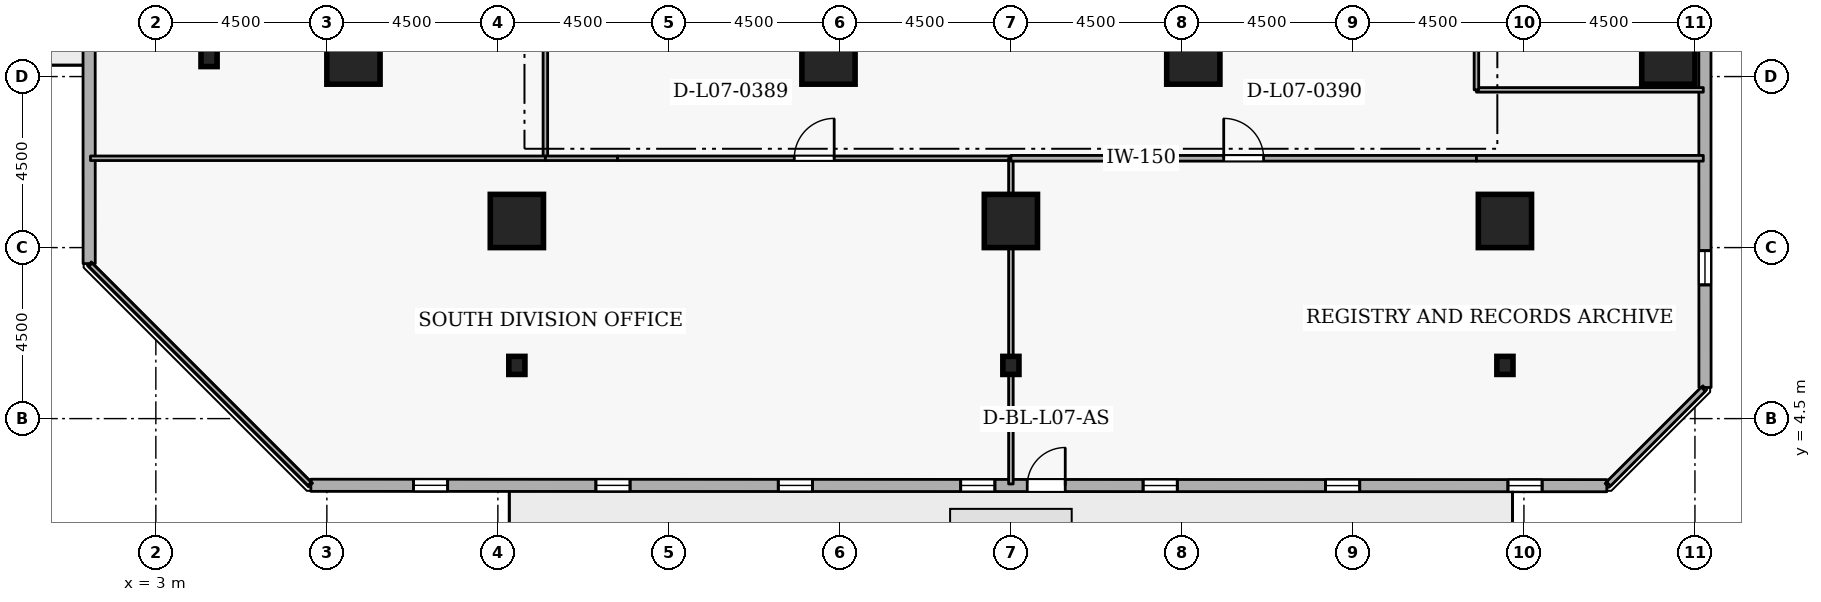
"""IFC4 building model, lengths in metres.
Left out: names, types, materials, properties, quantities, classifications, styles, units other than length and angle.
Written with IfcOpenShell. Run it as: python <this file> out.ifc"""

import sys

from ifc_helpers import new_model, si_unit, direction, frame, frame_2d, origin, origin_2d, place, context, subcontext, project, spatial, rectangle, i_section, extrude, element, fill, save


model = new_model("IFC4")
c1 = context("Model", 3, precision=1e-05, world=origin(), true_north=direction((0.0, 1.0)))
c2 = subcontext(c1, "Body", "Model", "MODEL_VIEW")
j1 = project(units=[si_unit("LENGTHUNIT", "METRE"), si_unit("PLANEANGLEUNIT", "RADIAN")], contexts=[c1])
p1 = place(None, origin())
s1 = spatial("IfcSite", under=j1, at=p1, CompositionType="ELEMENT")
p2 = place(p1, origin())
s2 = spatial("IfcBuilding", under=s1, at=p2, CompositionType="ELEMENT")
p3 = place(p2, frame((0.0, 0.0, 31.5)))
s3 = spatial("IfcBuildingStorey", under=s2, at=p3, CompositionType="ELEMENT", Elevation=31.5)
for number, where, z_axis, x_axis in (
    (1, (12.5, 9.7, 0.0), (0.0, 0.0, 1.0), (1.0, 0.0, 0.0)),
    (2, (25.5, 9.7, 0.0), (0.0, 0.0, 1.0), (1.0, 0.0, 0.0)),
    (3, (38.5, 9.7, 0.0), (0.0, 0.0, 1.0), (1.0, 0.0, 0.0)),
    (4, (42.8, 14.0, 0.0), (0.0, 0.0, 1.0), (1.0, 0.0, 0.0)),
    (5, (8.2, 14.0, 0.0), (0.0, 0.0, 1.0), (1.0, 0.0, 0.0)),
    (6, (20.7, 14.0, 0.0), (0.0, 0.0, 1.0), (1.0, 0.0, 0.0)),
    (7, (30.3, 14.0, 0.0), (0.0, 0.0, 1.0), (1.0, 0.0, 0.0)),
):
    element("IfcColumn", number, at=place(p3, frame(where, z_axis=z_axis, x_axis=x_axis)), inside=s3, PredefinedType="COLUMN", context=c2, shape_type="SweptSolid", body=[
        extrude(rectangle(XDim=1.4, YDim=1.4, at=origin_2d()), origin(), (0.0, 0.0, 1.0), 3.6),
    ])
for number, where, z_axis, x_axis in (
    (8, (12.5, 5.9, 0.0), (0.0, 0.0, 1.0), (1.0, 0.0, 0.0)),
    (9, (25.5, 5.9, 0.0), (0.0, 0.0, 1.0), (1.0, 0.0, 0.0)),
    (10, (38.5, 5.9, 0.0), (0.0, 0.0, 1.0), (1.0, 0.0, 0.0)),
    (11, (4.4, 14.0, 0.0), (0.0, 0.0, 1.0), (1.0, 0.0, 0.0)),
):
    element("IfcColumn", number, at=place(p3, frame(where, z_axis=z_axis, x_axis=x_axis)), inside=s3, PredefinedType="COLUMN", context=c2, shape_type="SweptSolid", body=[
        extrude(i_section(OverallWidth=0.424, OverallDepth=0.475, WebThickness=0.048, FlangeThickness=0.077, FilletRadius=0.015, at=origin_2d()), origin(), (0.0, 0.0, 1.0), 3.6),
    ])
p4 = place(p3, frame((7.079, 2.746, 0.0), z_axis=(0.0, 0.0, 1.0), x_axis=(0.999999952618, -0.000307837676, 0.0)))
e12 = element("IfcWall", 12, at=p4, inside=s3, PredefinedType="STANDARD", context=c2, shape_type="SweptSolid", body=[
    extrude(rectangle(XDim=34.103, YDim=0.32, at=frame_2d((17.051, 0.0))), origin(), (0.0, 0.0, 1.0), 2.7),
])
p5 = place(p4, frame((18.851, 0.0, 0.0)))
e13 = element("IfcOpeningElement", 13, at=p5, cuts=e12, PredefinedType="OPENING", context=c2, shape_type="SweptSolid", body=[
    extrude(rectangle(XDim=1.0, YDim=2.08, at=frame_2d((0.5, 1.04))), frame((0.0, 0.17, 0.0), z_axis=(0.0, -1.0, 0.0), x_axis=(1.0, 0.0, 0.0)), (0.0, 0.0, 1.0), 0.34),
])
p6 = place(p4, frame((2.7, 0.0, 0.72)))
e14 = element("IfcOpeningElement", 14, at=p6, cuts=e12, PredefinedType="OPENING", context=c2, shape_type="SweptSolid", body=[
    extrude(rectangle(XDim=0.9, YDim=1.75, at=frame_2d((0.45, 0.875))), frame((0.0, 0.17, 0.0), z_axis=(0.0, -1.0, 0.0), x_axis=(1.0, 0.0, 0.0)), (0.0, 0.0, 1.0), 0.34),
])
p7 = place(p4, frame((7.5, 0.0, 0.72)))
e15 = element("IfcOpeningElement", 15, at=p7, cuts=e12, PredefinedType="OPENING", context=c2, shape_type="SweptSolid", body=[
    extrude(rectangle(XDim=0.9, YDim=1.75, at=frame_2d((0.45, 0.875))), frame((0.0, 0.17, 0.0), z_axis=(0.0, -1.0, 0.0), x_axis=(1.0, 0.0, 0.0)), (0.0, 0.0, 1.0), 0.34),
])
p8 = place(p4, frame((12.3, 0.0, 0.72)))
e16 = element("IfcOpeningElement", 16, at=p8, cuts=e12, PredefinedType="OPENING", context=c2, shape_type="SweptSolid", body=[
    extrude(rectangle(XDim=0.9, YDim=1.75, at=frame_2d((0.45, 0.875))), frame((0.0, 0.17, 0.0), z_axis=(0.0, -1.0, 0.0), x_axis=(1.0, 0.0, 0.0)), (0.0, 0.0, 1.0), 0.34),
])
p9 = place(p4, frame((17.1, 0.0, 0.72)))
e17 = element("IfcOpeningElement", 17, at=p9, cuts=e12, PredefinedType="OPENING", context=c2, shape_type="SweptSolid", body=[
    extrude(rectangle(XDim=0.9, YDim=1.75, at=frame_2d((0.45, 0.875))), frame((0.0, 0.17, 0.0), z_axis=(0.0, -1.0, 0.0), x_axis=(1.0, 0.0, 0.0)), (0.0, 0.0, 1.0), 0.34),
])
p10 = place(p4, frame((21.9, 0.0, 0.72)))
e18 = element("IfcOpeningElement", 18, at=p10, cuts=e12, PredefinedType="OPENING", context=c2, shape_type="SweptSolid", body=[
    extrude(rectangle(XDim=0.9, YDim=1.75, at=frame_2d((0.45, 0.875))), frame((0.0, 0.17, 0.0), z_axis=(0.0, -1.0, 0.0), x_axis=(1.0, 0.0, 0.0)), (0.0, 0.0, 1.0), 0.34),
])
p11 = place(p4, frame((26.7, 0.0, 0.72)))
e19 = element("IfcOpeningElement", 19, at=p11, cuts=e12, PredefinedType="OPENING", context=c2, shape_type="SweptSolid", body=[
    extrude(rectangle(XDim=0.9, YDim=1.75, at=frame_2d((0.45, 0.875))), frame((0.0, 0.17, 0.0), z_axis=(0.0, -1.0, 0.0), x_axis=(1.0, 0.0, 0.0)), (0.0, 0.0, 1.0), 0.34),
])
p12 = place(p4, frame((31.5, 0.0, 0.72)))
e20 = element("IfcOpeningElement", 20, at=p12, cuts=e12, PredefinedType="OPENING", context=c2, shape_type="SweptSolid", body=[
    extrude(rectangle(XDim=0.9, YDim=1.75, at=frame_2d((0.45, 0.875))), frame((0.0, 0.17, 0.0), z_axis=(0.0, -1.0, 0.0), x_axis=(1.0, 0.0, 0.0)), (0.0, 0.0, 1.0), 0.34),
])
p13 = place(p3, frame((43.765, 5.319, 0.0), z_axis=(0.0, 0.0, 1.0), x_axis=(-0.000307837676, 0.999999952618, 0.0)))
e21 = element("IfcWall", 21, at=p13, inside=s3, PredefinedType="STANDARD", context=c2, shape_type="SweptSolid", body=[
    extrude(rectangle(XDim=34.103, YDim=0.32, at=frame_2d((17.051, 0.0))), origin(), (0.0, 0.0, 1.0), 2.7),
])
p14 = place(p13, frame((2.7, 0.0, 0.72)))
e22 = element("IfcOpeningElement", 22, at=p14, cuts=e21, PredefinedType="OPENING", context=c2, shape_type="SweptSolid", body=[
    extrude(rectangle(XDim=0.9, YDim=1.75, at=frame_2d((0.45, 0.875))), frame((0.0, 0.17, 0.0), z_axis=(0.0, -1.0, 0.0), x_axis=(1.0, 0.0, 0.0)), (0.0, 0.0, 1.0), 0.34),
])
p15 = place(p13, frame((12.3, 0.0, 0.72)))
e23 = element("IfcOpeningElement", 23, at=p15, cuts=e21, PredefinedType="OPENING", context=c2, shape_type="SweptSolid", body=[
    extrude(rectangle(XDim=0.9, YDim=1.75, at=frame_2d((0.45, 0.875))), frame((0.0, 0.17, 0.0), z_axis=(0.0, -1.0, 0.0), x_axis=(1.0, 0.0, 0.0)), (0.0, 0.0, 1.0), 0.34),
])
p16 = place(p13, frame((17.1, 0.0, 0.72)))
e24 = element("IfcOpeningElement", 24, at=p16, cuts=e21, PredefinedType="OPENING", context=c2, shape_type="SweptSolid", body=[
    extrude(rectangle(XDim=0.9, YDim=1.75, at=frame_2d((0.45, 0.875))), frame((0.0, 0.17, 0.0), z_axis=(0.0, -1.0, 0.0), x_axis=(1.0, 0.0, 0.0)), (0.0, 0.0, 1.0), 0.34),
])
p17 = place(p13, frame((26.7, 0.0, 0.72)))
e25 = element("IfcOpeningElement", 25, at=p17, cuts=e21, PredefinedType="OPENING", context=c2, shape_type="SweptSolid", body=[
    extrude(rectangle(XDim=0.9, YDim=1.75, at=frame_2d((0.45, 0.875))), frame((0.0, 0.17, 0.0), z_axis=(0.0, -1.0, 0.0), x_axis=(1.0, 0.0, 0.0)), (0.0, 0.0, 1.0), 0.34),
])
p18 = place(p13, frame((31.5, 0.0, 0.72)))
e26 = element("IfcOpeningElement", 26, at=p18, cuts=e21, PredefinedType="OPENING", context=c2, shape_type="SweptSolid", body=[
    extrude(rectangle(XDim=0.9, YDim=1.75, at=frame_2d((0.45, 0.875))), frame((0.0, 0.17, 0.0), z_axis=(0.0, -1.0, 0.0), x_axis=(1.0, 0.0, 0.0)), (0.0, 0.0, 1.0), 0.34),
])
p19 = place(p3, frame((1.235, 42.681, 0.0), z_axis=(0.0, 0.0, 1.0), x_axis=(0.000307837676, -0.999999952618, 0.0)))
e27 = element("IfcWall", 27, at=p19, inside=s3, PredefinedType="STANDARD", context=c2, shape_type="SweptSolid", body=[
    extrude(rectangle(XDim=34.103, YDim=0.32, at=frame_2d((17.051, 0.0))), origin(), (0.0, 0.0, 1.0), 2.7),
])
p20 = place(p19, frame((18.851, 0.0, 0.0)))
e28 = element("IfcOpeningElement", 28, at=p20, cuts=e27, PredefinedType="OPENING", context=c2, shape_type="SweptSolid", body=[
    extrude(rectangle(XDim=1.0, YDim=2.08, at=frame_2d((0.5, 1.04))), frame((0.0, 0.17, 0.0), z_axis=(0.0, -1.0, 0.0), x_axis=(1.0, 0.0, 0.0)), (0.0, 0.0, 1.0), 0.34),
])
p21 = place(p19, frame((2.7, 0.0, 0.72)))
e29 = element("IfcOpeningElement", 29, at=p21, cuts=e27, PredefinedType="OPENING", context=c2, shape_type="SweptSolid", body=[
    extrude(rectangle(XDim=0.9, YDim=1.75, at=frame_2d((0.45, 0.875))), frame((0.0, 0.17, 0.0), z_axis=(0.0, -1.0, 0.0), x_axis=(1.0, 0.0, 0.0)), (0.0, 0.0, 1.0), 0.34),
])
p22 = place(p19, frame((7.5, 0.0, 0.72)))
e30 = element("IfcOpeningElement", 30, at=p22, cuts=e27, PredefinedType="OPENING", context=c2, shape_type="SweptSolid", body=[
    extrude(rectangle(XDim=0.9, YDim=1.75, at=frame_2d((0.45, 0.875))), frame((0.0, 0.17, 0.0), z_axis=(0.0, -1.0, 0.0), x_axis=(1.0, 0.0, 0.0)), (0.0, 0.0, 1.0), 0.34),
])
p23 = place(p19, frame((12.3, 0.0, 0.72)))
e31 = element("IfcOpeningElement", 31, at=p23, cuts=e27, PredefinedType="OPENING", context=c2, shape_type="SweptSolid", body=[
    extrude(rectangle(XDim=0.9, YDim=1.75, at=frame_2d((0.45, 0.875))), frame((0.0, 0.17, 0.0), z_axis=(0.0, -1.0, 0.0), x_axis=(1.0, 0.0, 0.0)), (0.0, 0.0, 1.0), 0.34),
])
p24 = place(p19, frame((17.1, 0.0, 0.72)))
e32 = element("IfcOpeningElement", 32, at=p24, cuts=e27, PredefinedType="OPENING", context=c2, shape_type="SweptSolid", body=[
    extrude(rectangle(XDim=0.9, YDim=1.75, at=frame_2d((0.45, 0.875))), frame((0.0, 0.17, 0.0), z_axis=(0.0, -1.0, 0.0), x_axis=(1.0, 0.0, 0.0)), (0.0, 0.0, 1.0), 0.34),
])
p25 = place(p19, frame((21.9, 0.0, 0.72)))
e33 = element("IfcOpeningElement", 33, at=p25, cuts=e27, PredefinedType="OPENING", context=c2, shape_type="SweptSolid", body=[
    extrude(rectangle(XDim=0.9, YDim=1.75, at=frame_2d((0.45, 0.875))), frame((0.0, 0.17, 0.0), z_axis=(0.0, -1.0, 0.0), x_axis=(1.0, 0.0, 0.0)), (0.0, 0.0, 1.0), 0.34),
])
p26 = place(p19, frame((26.7, 0.0, 0.72)))
e34 = element("IfcOpeningElement", 34, at=p26, cuts=e27, PredefinedType="OPENING", context=c2, shape_type="SweptSolid", body=[
    extrude(rectangle(XDim=0.9, YDim=1.75, at=frame_2d((0.45, 0.875))), frame((0.0, 0.17, 0.0), z_axis=(0.0, -1.0, 0.0), x_axis=(1.0, 0.0, 0.0)), (0.0, 0.0, 1.0), 0.34),
])
p27 = place(p3, frame((13.25, 20.7, 0.0), z_axis=(0.0, 0.0, 1.0), x_axis=(0.0, -1.0, 0.0)))
e35 = element("IfcWall", 35, at=p27, inside=s3, PredefinedType="PARTITIONING", context=c2, shape_type="SweptSolid", body=[
    extrude(rectangle(XDim=9.35, YDim=0.12, at=frame_2d((4.675, 0.0))), origin(), (0.0, 0.0, 1.0), 3.34),
])
p28 = place(p27, frame((4.15, 0.0, 0.0)))
e36 = element("IfcOpeningElement", 36, at=p28, cuts=e35, PredefinedType="OPENING", context=c2, shape_type="SweptSolid", body=[
    extrude(rectangle(XDim=1.05, YDim=2.1, at=frame_2d((0.525, 1.05))), frame((0.0, 0.07, 0.0), z_axis=(0.0, -1.0, 0.0), x_axis=(1.0, 0.0, 0.0)), (0.0, 0.0, 1.0), 0.14),
])
p29 = place(p3, frame((13.25, 11.35, 0.0), z_axis=(0.0, 0.0, 1.0), x_axis=(-1.0, 0.0, 0.0)))
e37 = element("IfcWall", 37, at=p29, inside=s3, PredefinedType="PARTITIONING", context=c2, shape_type="SweptSolid", body=[
    extrude(rectangle(XDim=11.97, YDim=0.12, at=frame_2d((5.985, 0.0))), origin(), (0.0, 0.0, 1.0), 3.34),
])
p30 = place(p3, frame((43.72, 13.15, 0.0), z_axis=(0.0, 0.0, 1.0), x_axis=(-1.0, 0.0, 0.0)))
e38 = element("IfcWall", 38, at=p30, inside=s3, PredefinedType="PARTITIONING", context=c2, shape_type="SweptSolid", body=[
    extrude(rectangle(XDim=5.97, YDim=0.12, at=frame_2d((2.985, 0.0))), origin(), (0.0, 0.0, 1.0), 3.34),
])
p31 = place(p3, frame((37.75, 13.15, 0.0), z_axis=(0.0, 0.0, 1.0), x_axis=(0.0, 1.0, 0.0)))
e39 = element("IfcWall", 39, at=p31, inside=s3, PredefinedType="PARTITIONING", context=c2, shape_type="SweptSolid", body=[
    extrude(rectangle(XDim=1.862, YDim=0.12, at=frame_2d((0.931, 0.0))), origin(), (0.0, 0.0, 1.0), 3.34),
])
p32 = place(p3, frame((7.048, 2.78, 0.0), z_axis=(0.0, 0.0, 1.0), x_axis=(-0.707106781187, 0.707106781187, 0.0)))
e40 = element("IfcWall", 40, at=p32, inside=s3, PredefinedType="PARTITIONING", context=c2, shape_type="SweptSolid", body=[
    extrude(rectangle(XDim=8.156, YDim=0.12, at=frame_2d((4.078, 0.0))), origin(), (0.0, 0.0, 1.0), 3.34),
])
p33 = place(p3, frame((13.25, 11.35, 0.0), z_axis=(0.0, 0.0, 1.0), x_axis=(1.0, 0.0, 0.0)))
e41 = element("IfcWall", 41, at=p33, inside=s3, PredefinedType="PARTITIONING", context=c2, shape_type="SweptSolid", body=[
    extrude(rectangle(XDim=1.9, YDim=0.12, at=frame_2d((0.95, 0.0))), origin(), (0.0, 0.0, 1.0), 3.34),
])
p34 = place(p3, frame((15.15, 11.35, 0.0), z_axis=(0.0, 0.0, 1.0), x_axis=(1.0, 0.0, 0.0)))
e42 = element("IfcWall", 42, at=p34, inside=s3, PredefinedType="PARTITIONING", context=c2, shape_type="SweptSolid", body=[
    extrude(rectangle(XDim=10.35, YDim=0.12, at=frame_2d((5.175, 0.0))), origin(), (0.0, 0.0, 1.0), 3.34),
])
p35 = place(p34, frame((4.65, 0.0, 0.0)))
e43 = element("IfcOpeningElement", 43, at=p35, cuts=e42, PredefinedType="OPENING", context=c2, shape_type="SweptSolid", body=[
    extrude(rectangle(XDim=1.05, YDim=2.1, at=frame_2d((0.525, 1.05))), frame((0.0, 0.07, 0.0), z_axis=(0.0, -1.0, 0.0), x_axis=(1.0, 0.0, 0.0)), (0.0, 0.0, 1.0), 0.14),
])
p36 = place(p3, frame((25.5, 11.35, 0.0), z_axis=(0.0, 0.0, 1.0), x_axis=(0.0, -1.0, 0.0)))
e44 = element("IfcWall", 44, at=p36, inside=s3, PredefinedType="PARTITIONING", context=c2, shape_type="SweptSolid", body=[
    extrude(rectangle(XDim=8.57, YDim=0.12, at=frame_2d((4.285, 0.0))), origin(), (0.0, 0.0, 1.0), 2.878),
])
p37 = place(p3, frame((25.5, 11.35, 0.0), z_axis=(0.0, 0.0, 1.0), x_axis=(1.0, 0.0, 0.0)))
e45 = element("IfcWall", 45, at=p37, inside=s3, PredefinedType="PARTITIONING", context=c2, shape_type="SweptSolid", body=[
    extrude(rectangle(XDim=12.25, YDim=0.15, at=frame_2d((6.125, 0.0))), origin(), (0.0, 0.0, 1.0), 3.34),
])
p38 = place(p37, frame((5.6, 0.0, 0.0)))
e46 = element("IfcOpeningElement", 46, at=p38, cuts=e45, PredefinedType="OPENING", context=c2, shape_type="SweptSolid", body=[
    extrude(rectangle(XDim=1.05, YDim=2.1, at=frame_2d((0.525, 1.05))), frame((0.0, 0.085, 0.0), z_axis=(0.0, -1.0, 0.0), x_axis=(1.0, 0.0, 0.0)), (0.0, 0.0, 1.0), 0.17),
])
p39 = place(p3, frame((37.75, 11.35, 0.0), z_axis=(0.0, 0.0, 1.0), x_axis=(1.0, 0.0, 0.0)))
e47 = element("IfcWall", 47, at=p39, inside=s3, PredefinedType="PARTITIONING", context=c2, shape_type="SweptSolid", body=[
    extrude(rectangle(XDim=5.97, YDim=0.15, at=frame_2d((2.985, 0.0))), origin(), (0.0, 0.0, 1.0), 3.34),
])
p40 = place(p3, frame((43.72, 5.275, 0.0), z_axis=(0.0, 0.0, 1.0), x_axis=(-0.707106781187, -0.707106781187, 0.0)))
e48 = element("IfcWall", 48, at=p40, inside=s3, PredefinedType="PARTITIONING", context=c2, shape_type="SweptSolid", body=[
    extrude(rectangle(XDim=3.528, YDim=0.15, at=frame_2d((1.764, 0.0))), origin(), (0.0, 0.0, 1.0), 3.34),
])
p41 = place(p5, origin())
e49 = element("IfcDoor", 49, at=p41, inside=s3, OperationType="SINGLE_SWING_RIGHT", PredefinedType="DOOR", context=c2, shape_type="SweptSolid", body=[
    extrude(rectangle(XDim=1.0, YDim=2.08, at=frame_2d((0.5, 1.04))), frame((0.0, 0.025, 0.0), z_axis=(0.0, -1.0, 0.0), x_axis=(1.0, 0.0, 0.0)), (0.0, 0.0, 1.0), 0.05),
])
fill(e13, e49)
p42 = place(p6, origin())
e50 = element("IfcWindow", 50, at=p42, inside=s3, PartitioningType="SINGLE_PANEL", PredefinedType="WINDOW", context=c2, shape_type="SweptSolid", body=[
    extrude(rectangle(XDim=0.9, YDim=1.75, at=frame_2d((0.45, 0.875))), frame((0.0, 0.03, 0.0), z_axis=(0.0, -1.0, 0.0), x_axis=(1.0, 0.0, 0.0)), (0.0, 0.0, 1.0), 0.06),
])
fill(e14, e50)
p43 = place(p7, origin())
e51 = element("IfcWindow", 51, at=p43, inside=s3, PartitioningType="SINGLE_PANEL", PredefinedType="WINDOW", context=c2, shape_type="SweptSolid", body=[
    extrude(rectangle(XDim=0.9, YDim=1.75, at=frame_2d((0.45, 0.875))), frame((0.0, 0.03, 0.0), z_axis=(0.0, -1.0, 0.0), x_axis=(1.0, 0.0, 0.0)), (0.0, 0.0, 1.0), 0.06),
])
fill(e15, e51)
p44 = place(p8, origin())
e52 = element("IfcWindow", 52, at=p44, inside=s3, PartitioningType="SINGLE_PANEL", PredefinedType="WINDOW", context=c2, shape_type="SweptSolid", body=[
    extrude(rectangle(XDim=0.9, YDim=1.75, at=frame_2d((0.45, 0.875))), frame((0.0, 0.03, 0.0), z_axis=(0.0, -1.0, 0.0), x_axis=(1.0, 0.0, 0.0)), (0.0, 0.0, 1.0), 0.06),
])
fill(e16, e52)
p45 = place(p9, origin())
e53 = element("IfcWindow", 53, at=p45, inside=s3, PartitioningType="SINGLE_PANEL", PredefinedType="WINDOW", context=c2, shape_type="SweptSolid", body=[
    extrude(rectangle(XDim=0.9, YDim=1.75, at=frame_2d((0.45, 0.875))), frame((0.0, 0.03, 0.0), z_axis=(0.0, -1.0, 0.0), x_axis=(1.0, 0.0, 0.0)), (0.0, 0.0, 1.0), 0.06),
])
fill(e17, e53)
p46 = place(p10, origin())
e54 = element("IfcWindow", 54, at=p46, inside=s3, PartitioningType="SINGLE_PANEL", PredefinedType="WINDOW", context=c2, shape_type="SweptSolid", body=[
    extrude(rectangle(XDim=0.9, YDim=1.75, at=frame_2d((0.45, 0.875))), frame((0.0, 0.03, 0.0), z_axis=(0.0, -1.0, 0.0), x_axis=(1.0, 0.0, 0.0)), (0.0, 0.0, 1.0), 0.06),
])
fill(e18, e54)
p47 = place(p11, origin())
e55 = element("IfcWindow", 55, at=p47, inside=s3, PartitioningType="SINGLE_PANEL", PredefinedType="WINDOW", context=c2, shape_type="SweptSolid", body=[
    extrude(rectangle(XDim=0.9, YDim=1.75, at=frame_2d((0.45, 0.875))), frame((0.0, 0.03, 0.0), z_axis=(0.0, -1.0, 0.0), x_axis=(1.0, 0.0, 0.0)), (0.0, 0.0, 1.0), 0.06),
])
fill(e19, e55)
p48 = place(p12, origin())
e56 = element("IfcWindow", 56, at=p48, inside=s3, PartitioningType="SINGLE_PANEL", PredefinedType="WINDOW", context=c2, shape_type="SweptSolid", body=[
    extrude(rectangle(XDim=0.9, YDim=1.75, at=frame_2d((0.45, 0.875))), frame((0.0, 0.03, 0.0), z_axis=(0.0, -1.0, 0.0), x_axis=(1.0, 0.0, 0.0)), (0.0, 0.0, 1.0), 0.06),
])
fill(e20, e56)
p49 = place(p14, origin())
e57 = element("IfcWindow", 57, at=p49, inside=s3, PartitioningType="SINGLE_PANEL", PredefinedType="WINDOW", context=c2, shape_type="SweptSolid", body=[
    extrude(rectangle(XDim=0.9, YDim=1.75, at=frame_2d((0.45, 0.875))), frame((0.0, 0.03, 0.0), z_axis=(0.0, -1.0, 0.0), x_axis=(1.0, 0.0, 0.0)), (0.0, 0.0, 1.0), 0.06),
])
fill(e22, e57)
p50 = place(p35, origin())
e58 = element("IfcDoor", 58, at=p50, inside=s3, OperationType="SINGLE_SWING_RIGHT", PredefinedType="DOOR", context=c2, shape_type="SweptSolid", body=[
    extrude(rectangle(XDim=1.05, YDim=2.1, at=frame_2d((0.525, 1.05))), frame((0.0, 0.025, 0.0), z_axis=(0.0, -1.0, 0.0), x_axis=(1.0, 0.0, 0.0)), (0.0, 0.0, 1.0), 0.05),
])
fill(e43, e58)
p51 = place(p38, origin())
e59 = element("IfcDoor", 59, at=p51, inside=s3, OperationType="SINGLE_SWING_LEFT", PredefinedType="DOOR", context=c2, shape_type="SweptSolid", body=[
    extrude(rectangle(XDim=1.05, YDim=2.1, at=frame_2d((0.525, 1.05))), frame((0.0, 0.025, 0.0), z_axis=(0.0, -1.0, 0.0), x_axis=(1.0, 0.0, 0.0)), (0.0, 0.0, 1.0), 0.05),
])
fill(e46, e59)
save(model, sys.argv[1])
